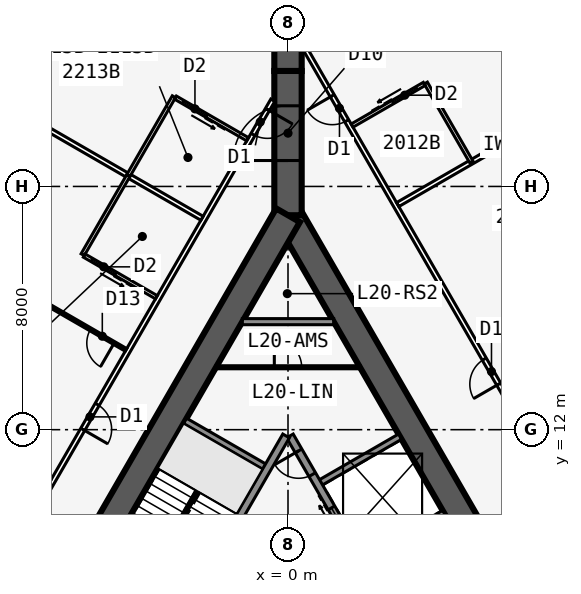
"""IFC4 building model, lengths in metres.
Left out: names, types, materials, properties, quantities, classifications, styles, units other than length and angle.
Written with IfcOpenShell. Run it as: python <this file> out.ifc"""

import sys

from ifc_helpers import new_model, si_unit, direction, frame, frame_2d, origin, place, context, subcontext, project, spatial, rectangle, extrude, element, fill, save


model = new_model("IFC4")
c1 = context("Model", 3, precision=1e-05, world=origin(), true_north=direction((0.0, 1.0)))
c2 = subcontext(c1, "Body", "Model", "MODEL_VIEW")
j1 = project(units=[si_unit("LENGTHUNIT", "METRE"), si_unit("PLANEANGLEUNIT", "RADIAN")], contexts=[c1])
p1 = place(None, origin())
s1 = spatial("IfcSite", under=j1, at=p1, CompositionType="ELEMENT")
p2 = place(p1, origin())
s2 = spatial("IfcBuilding", under=s1, at=p2, CompositionType="ELEMENT")
p3 = place(p2, frame((0.0, 0.0, 79.5)))
s3 = spatial("IfcBuildingStorey", under=s2, at=p3, CompositionType="ELEMENT", Elevation=79.5)
p4 = place(p3, frame((16.5, -9.526, 0.0), z_axis=(0.0, 0.0, 1.0), x_axis=(-0.499999749417, 0.866025548458, 0.0)))
e1 = element("IfcWall", 1, at=p4, inside=s3, PredefinedType="SHEAR", context=c2, shape_type="SweptSolid", body=[
    extrude(rectangle(XDim=33.0, YDim=0.9, at=frame_2d((16.5, 0.0))), origin(), (0.0, 0.0, 1.0), 3.4),
])
p5 = place(p4, frame((14.15, 0.0, 0.0)))
e2 = element("IfcOpeningElement", 2, at=p5, cuts=e1, PredefinedType="OPENING", context=c2, shape_type="SweptSolid", body=[
    extrude(rectangle(XDim=1.8, YDim=2.13, at=frame_2d((0.9, 1.065))), frame((0.0, 0.46, 0.0), z_axis=(0.0, -1.0, 0.0), x_axis=(1.0, 0.0, 0.0)), (0.0, 0.0, 1.0), 0.92),
])
p6 = place(p4, frame((12.6, 0.0, 0.0)))
e3 = element("IfcOpeningElement", 3, at=p6, cuts=e1, PredefinedType="OPENING", context=c2, shape_type="SweptSolid", body=[
    extrude(rectangle(XDim=1.0, YDim=2.13, at=frame_2d((0.5, 1.065))), frame((0.0, 0.46, 0.0), z_axis=(0.0, -1.0, 0.0), x_axis=(1.0, 0.0, 0.0)), (0.0, 0.0, 1.0), 0.92),
])
p7 = place(p3, frame((5.379, 2.586, 0.0), z_axis=(0.0, 0.0, 1.0), x_axis=(-0.500001375892, 0.866024609411, 0.0)))
e4 = element("IfcWall", 4, at=p7, inside=s3, PredefinedType="SOLIDWALL", context=c2, shape_type="SweptSolid", body=[
    extrude(rectangle(XDim=10.633, YDim=0.25, at=frame_2d((5.316, 0.0))), origin(), (0.0, 0.0, 1.0), 3.235),
])
p8 = place(p7, frame((9.164, 0.0, 0.0)))
e5 = element("IfcOpeningElement", 5, at=p8, cuts=e4, PredefinedType="OPENING", context=c2, shape_type="SweptSolid", body=[
    extrude(rectangle(XDim=0.9, YDim=2.13, at=frame_2d((0.45, 1.065))), frame((0.0, 0.135, 0.0), z_axis=(0.0, -1.0, 0.0), x_axis=(1.0, 0.0, 0.0)), (0.0, 0.0, 1.0), 0.27),
])
p9 = place(p7, frame((1.0, 0.0, 0.0)))
e6 = element("IfcOpeningElement", 6, at=p9, cuts=e4, PredefinedType="OPENING", context=c2, shape_type="SweptSolid", body=[
    extrude(rectangle(XDim=1.1, YDim=2.13, at=frame_2d((0.55, 1.065))), frame((0.0, 0.135, 0.0), z_axis=(0.0, -1.0, 0.0), x_axis=(1.0, 0.0, 0.0)), (0.0, 0.0, 1.0), 0.27),
])
p10 = place(p7, frame((3.9, 0.0, 0.0)))
e7 = element("IfcOpeningElement", 7, at=p10, cuts=e4, PredefinedType="OPENING", context=c2, shape_type="SweptSolid", body=[
    extrude(rectangle(XDim=1.1, YDim=2.13, at=frame_2d((0.55, 1.065))), frame((0.0, 0.135, 0.0), z_axis=(0.0, -1.0, 0.0), x_axis=(1.0, 0.0, 0.0)), (0.0, 0.0, 1.0), 0.27),
])
p11 = place(p7, frame((6.8, 0.0, 0.0)))
e8 = element("IfcOpeningElement", 8, at=p11, cuts=e4, PredefinedType="OPENING", context=c2, shape_type="SweptSolid", body=[
    extrude(rectangle(XDim=1.1, YDim=2.13, at=frame_2d((0.55, 1.065))), frame((0.0, 0.135, 0.0), z_axis=(0.0, -1.0, 0.0), x_axis=(1.0, 0.0, 0.0)), (0.0, 0.0, 1.0), 0.27),
])
for number, where, z_axis, x_axis in (
    (9, (2.429, 7.696, 0.0), (0.0, 0.0, 1.0), (0.866, 0.5, 0.0)),
    (10, (0.979, 10.207, 0.0), (0.0, 0.0, 1.0), (0.866, 0.5, 0.0)),
):
    element("IfcWall", number, at=place(p3, frame(where, z_axis=z_axis, x_axis=x_axis)), inside=s3, PredefinedType="SOLIDWALL", context=c2, shape_type="SweptSolid", body=[
        extrude(rectangle(XDim=3.125, YDim=0.2, at=frame_2d((1.562, 0.0))), origin(), (0.0, 0.0, 1.0), 3.235),
    ])
p12 = place(p3, frame((0.0, 19.052, 0.0), z_axis=(0.0, 0.0, 1.0), x_axis=(-0.499999749417, -0.866025548458, 0.0)))
e11 = element("IfcWall", 11, at=p12, inside=s3, PredefinedType="SHEAR", context=c2, shape_type="SweptSolid", body=[
    extrude(rectangle(XDim=33.0, YDim=0.9, at=frame_2d((16.5, 0.0))), origin(), (0.0, 0.0, 1.0), 3.4),
])
p13 = place(p12, frame((14.15, 0.0, 0.0)))
e12 = element("IfcOpeningElement", 12, at=p13, cuts=e11, PredefinedType="OPENING", context=c2, shape_type="SweptSolid", body=[
    extrude(rectangle(XDim=1.8, YDim=2.13, at=frame_2d((0.9, 1.065))), frame((0.0, 0.46, 0.0), z_axis=(0.0, -1.0, 0.0), x_axis=(1.0, 0.0, 0.0)), (0.0, 0.0, 1.0), 0.92),
])
p14 = place(p12, frame((12.6, 0.0, 0.0)))
e13 = element("IfcOpeningElement", 13, at=p14, cuts=e11, PredefinedType="OPENING", context=c2, shape_type="SweptSolid", body=[
    extrude(rectangle(XDim=1.0, YDim=2.13, at=frame_2d((0.5, 1.065))), frame((0.0, 0.46, 0.0), z_axis=(0.0, -1.0, 0.0), x_axis=(1.0, 0.0, 0.0)), (0.0, 0.0, 1.0), 0.92),
])
p15 = place(p3, frame((-0.062, 11.794, 0.0), z_axis=(0.0, 0.0, 1.0), x_axis=(-0.500006680225, -0.86602154692, 0.0)))
e14 = element("IfcWall", 14, at=p15, inside=s3, PredefinedType="SOLIDWALL", context=c2, shape_type="SweptSolid", body=[
    extrude(rectangle(XDim=7.733, YDim=0.25, at=frame_2d((3.866, 0.0))), origin(), (0.0, 0.0, 1.0), 3.235),
])
p16 = place(p3, frame((-0.679, 10.727, 0.0), z_axis=(0.0, 0.0, 1.0), x_axis=(-0.866022959057, 0.500004234368, 0.0)))
e15 = element("IfcWall", 15, at=p16, inside=s3, PredefinedType="SOLIDWALL", context=c2, shape_type="SweptSolid", body=[
    extrude(rectangle(XDim=3.125, YDim=0.2, at=frame_2d((1.562, 0.0))), origin(), (0.0, 0.0, 1.0), 3.235),
])
p17 = place(p3, frame((0.0, 19.052, 0.0), z_axis=(0.0, 0.0, 1.0), x_axis=(0.0, 1.0, 0.0)))
e16 = element("IfcWall", 16, at=p17, inside=s3, PredefinedType="SHEAR", context=c2, shape_type="SweptSolid", body=[
    extrude(rectangle(XDim=4.746, YDim=0.9, at=frame_2d((2.373, 0.0))), origin(), (0.0, 0.0, 1.0), 3.4),
])
p18 = place(p17, frame((1.8, 0.0, 0.0)))
e17 = element("IfcOpeningElement", 17, at=p18, cuts=e16, PredefinedType="OPENING", context=c2, shape_type="SweptSolid", body=[
    extrude(rectangle(XDim=1.8, YDim=2.13, at=frame_2d((0.9, 1.065))), frame((0.0, 0.46, 0.0), z_axis=(0.0, -1.0, 0.0), x_axis=(1.0, 0.0, 0.0)), (0.0, 0.0, 1.0), 0.92),
])
p19 = place(p3, frame((0.0, 23.799, 0.0), z_axis=(0.0, 0.0, 1.0), x_axis=(0.0, 1.0, 0.0)))
e18 = element("IfcWall", 18, at=p19, inside=s3, PredefinedType="SHEAR", context=c2, shape_type="SweptSolid", body=[
    extrude(rectangle(XDim=1.155, YDim=0.9, at=frame_2d((0.577, 0.0))), origin(), (0.0, 0.0, 1.0), 3.4),
])
p20 = place(p3, frame((10.511, 23.357, 0.0), z_axis=(0.0, 0.0, 1.0), x_axis=(-0.682289646561, 0.731081964075, 0.0)))
e19 = element("IfcWall", 19, at=p20, inside=s3, PredefinedType="STANDARD", context=c2, shape_type="SweptSolid", body=[
    extrude(rectangle(XDim=8.211, YDim=0.25, at=frame_2d((4.105, 0.0))), origin(), (0.0, 0.0, 1.0), 3.235),
])
p21 = place(p20, frame((2.006, 0.0, 0.45)))
e20 = element("IfcOpeningElement", 20, at=p21, cuts=e19, PredefinedType="OPENING", context=c2, shape_type="SweptSolid", body=[
    extrude(rectangle(XDim=4.2, YDim=2.4, at=frame_2d((2.1, 1.2))), frame((0.0, 0.135, 0.0), z_axis=(0.0, -1.0, 0.0), x_axis=(1.0, 0.0, 0.0)), (0.0, 0.0, 1.0), 0.27),
])
p22 = place(p3, frame((-4.909, 29.36, 0.0), z_axis=(0.0, 0.0, 1.0), x_axis=(-0.682289646561, -0.731081964075, 0.0)))
e21 = element("IfcWall", 21, at=p22, inside=s3, PredefinedType="STANDARD", context=c2, shape_type="SweptSolid", body=[
    extrude(rectangle(XDim=8.211, YDim=0.25, at=frame_2d((4.105, 0.0))), origin(), (0.0, 0.0, 1.0), 3.235),
])
p23 = place(p22, frame((2.006, 0.0, 0.45)))
e22 = element("IfcOpeningElement", 22, at=p23, cuts=e21, PredefinedType="OPENING", context=c2, shape_type="SweptSolid", body=[
    extrude(rectangle(XDim=4.2, YDim=2.4, at=frame_2d((2.1, 1.2))), frame((0.0, 0.135, 0.0), z_axis=(0.0, -1.0, 0.0), x_axis=(1.0, 0.0, 0.0)), (0.0, 0.0, 1.0), 0.27),
])
p24 = place(p3, frame((21.586, -11.885, 0.0), z_axis=(0.0, 0.0, 1.0), x_axis=(-0.500001915564, 0.86602429783, 0.0)))
e23 = element("IfcWall", 23, at=p24, inside=s3, PredefinedType="PARTITIONING", context=c2, shape_type="SweptSolid", body=[
    extrude(rectangle(XDim=42.172, YDim=0.15, at=frame_2d((21.086, 0.0))), origin(), (0.0, 0.0, 1.0), 3.235),
])
p25 = place(p24, frame((1.911, 0.0, 0.0)))
e24 = element("IfcOpeningElement", 24, at=p25, cuts=e23, PredefinedType="OPENING", context=c2, shape_type="SweptSolid", body=[
    extrude(rectangle(XDim=0.95, YDim=2.13, at=frame_2d((0.475, 1.065))), frame((0.0, 0.085, 0.0), z_axis=(0.0, -1.0, 0.0), x_axis=(1.0, 0.0, 0.0)), (0.0, 0.0, 1.0), 0.17),
])
p26 = place(p24, frame((8.711, 0.0, 0.0)))
e25 = element("IfcOpeningElement", 25, at=p26, cuts=e23, PredefinedType="OPENING", context=c2, shape_type="SweptSolid", body=[
    extrude(rectangle(XDim=0.95, YDim=2.13, at=frame_2d((0.475, 1.065))), frame((0.0, 0.085, 0.0), z_axis=(0.0, -1.0, 0.0), x_axis=(1.0, 0.0, 0.0)), (0.0, 0.0, 1.0), 0.17),
])
p27 = place(p24, frame((13.111, 0.0, 0.0)))
e26 = element("IfcOpeningElement", 26, at=p27, cuts=e23, PredefinedType="OPENING", context=c2, shape_type="SweptSolid", body=[
    extrude(rectangle(XDim=0.95, YDim=2.13, at=frame_2d((0.475, 1.065))), frame((0.0, 0.085, 0.0), z_axis=(0.0, -1.0, 0.0), x_axis=(1.0, 0.0, 0.0)), (0.0, 0.0, 1.0), 0.17),
])
p28 = place(p24, frame((23.711, 0.0, 0.0)))
e27 = element("IfcOpeningElement", 27, at=p28, cuts=e23, PredefinedType="OPENING", context=c2, shape_type="SweptSolid", body=[
    extrude(rectangle(XDim=0.95, YDim=2.13, at=frame_2d((0.475, 1.065))), frame((0.0, 0.085, 0.0), z_axis=(0.0, -1.0, 0.0), x_axis=(1.0, 0.0, 0.0)), (0.0, 0.0, 1.0), 0.17),
])
p29 = place(p24, frame((29.311, 0.0, 0.0)))
e28 = element("IfcOpeningElement", 28, at=p29, cuts=e23, PredefinedType="OPENING", context=c2, shape_type="SweptSolid", body=[
    extrude(rectangle(XDim=0.95, YDim=2.13, at=frame_2d((0.475, 1.065))), frame((0.0, 0.085, 0.0), z_axis=(0.0, -1.0, 0.0), x_axis=(1.0, 0.0, 0.0)), (0.0, 0.0, 1.0), 0.17),
])
p30 = place(p24, frame((39.311, 0.0, 0.0)))
e29 = element("IfcOpeningElement", 29, at=p30, cuts=e23, PredefinedType="OPENING", context=c2, shape_type="SweptSolid", body=[
    extrude(rectangle(XDim=0.95, YDim=2.13, at=frame_2d((0.475, 1.065))), frame((0.0, 0.085, 0.0), z_axis=(0.0, -1.0, 0.0), x_axis=(1.0, 0.0, 0.0)), (0.0, 0.0, 1.0), 0.17),
])
p31 = place(p3, frame((3.608, 19.404, 0.0), z_axis=(0.0, 0.0, 1.0), x_axis=(0.866021300503, 0.500007107024, 0.0)))
e30 = element("IfcWall", 30, at=p31, inside=s3, PredefinedType="PARTITIONING", context=c2, shape_type="SweptSolid", body=[
    extrude(rectangle(XDim=7.82, YDim=0.15, at=frame_2d((3.91, 0.0))), origin(), (0.0, 0.0, 1.0), 2.389),
])
p32 = place(p3, frame((6.033, 20.803, 0.0), z_axis=(0.0, 0.0, 1.0), x_axis=(-0.499990139034, 0.866031096941, 0.0)))
e31 = element("IfcWall", 31, at=p32, inside=s3, PredefinedType="PLUMBINGWALL", context=c2, shape_type="SweptSolid", body=[
    extrude(rectangle(XDim=3.0, YDim=0.12, at=frame_2d((1.5, 0.0))), origin(), (0.0, 0.0, 1.0), 3.235),
])
p33 = place(p3, frame((2.108, 22.002, 0.0), z_axis=(0.0, 0.0, 1.0), x_axis=(0.866035715982, 0.499982138324, 0.0)))
e32 = element("IfcWall", 32, at=p33, inside=s3, PredefinedType="PLUMBINGWALL", context=c2, shape_type="SweptSolid", body=[
    extrude(rectangle(XDim=2.74, YDim=0.12, at=frame_2d((1.37, 0.0))), origin(), (0.0, 0.0, 1.0), 3.235),
])
p34 = place(p33, frame((1.55, 0.0, 0.0)))
e33 = element("IfcOpeningElement", 33, at=p34, cuts=e32, PredefinedType="OPENING", context=c2, shape_type="SweptSolid", body=[
    extrude(rectangle(XDim=0.9, YDim=2.13, at=frame_2d((0.45, 1.065))), frame((0.0, 0.07, 0.0), z_axis=(0.0, -1.0, 0.0), x_axis=(1.0, 0.0, 0.0)), (0.0, 0.0, 1.0), 0.14),
])
p35 = place(p3, frame((-0.5, 22.836, 0.0), z_axis=(0.0, 0.0, 1.0), x_axis=(-0.500001677587, -0.866024435227, 0.0)))
e34 = element("IfcWall", 34, at=p35, inside=s3, PredefinedType="PARTITIONING", context=c2, shape_type="SweptSolid", body=[
    extrude(rectangle(XDim=39.054, YDim=0.15, at=frame_2d((19.527, 0.0))), origin(), (0.0, 0.0, 1.0), 3.235),
])
p36 = place(p35, frame((0.352, 0.0, 0.0)))
e35 = element("IfcOpeningElement", 35, at=p36, cuts=e34, PredefinedType="OPENING", context=c2, shape_type="SweptSolid", body=[
    extrude(rectangle(XDim=0.95, YDim=2.13, at=frame_2d((0.475, 1.065))), frame((0.0, 0.085, 0.0), z_axis=(0.0, -1.0, 0.0), x_axis=(1.0, 0.0, 0.0)), (0.0, 0.0, 1.0), 0.17),
])
p37 = place(p35, frame((11.552, 0.0, 0.0)))
e36 = element("IfcOpeningElement", 36, at=p37, cuts=e34, PredefinedType="OPENING", context=c2, shape_type="SweptSolid", body=[
    extrude(rectangle(XDim=0.95, YDim=2.13, at=frame_2d((0.475, 1.065))), frame((0.0, 0.085, 0.0), z_axis=(0.0, -1.0, 0.0), x_axis=(1.0, 0.0, 0.0)), (0.0, 0.0, 1.0), 0.17),
])
p38 = place(p35, frame((21.552, 0.0, 0.0)))
e37 = element("IfcOpeningElement", 37, at=p38, cuts=e34, PredefinedType="OPENING", context=c2, shape_type="SweptSolid", body=[
    extrude(rectangle(XDim=0.95, YDim=2.13, at=frame_2d((0.475, 1.065))), frame((0.0, 0.085, 0.0), z_axis=(0.0, -1.0, 0.0), x_axis=(1.0, 0.0, 0.0)), (0.0, 0.0, 1.0), 0.17),
])
p39 = place(p35, frame((36.546, 0.0, 0.0)))
e38 = element("IfcOpeningElement", 38, at=p39, cuts=e34, PredefinedType="OPENING", context=c2, shape_type="SweptSolid", body=[
    extrude(rectangle(XDim=0.95, YDim=2.13, at=frame_2d((0.475, 1.065))), frame((0.0, 0.085, 0.0), z_axis=(0.0, -1.0, 0.0), x_axis=(1.0, 0.0, 0.0)), (0.0, 0.0, 1.0), 0.17),
])
p40 = place(p3, frame((-2.829, 18.954, 0.0), z_axis=(0.0, 0.0, 1.0), x_axis=(-0.866020536561, 0.500008430184, 0.0)))
e39 = element("IfcWall", 39, at=p40, inside=s3, PredefinedType="PARTITIONING", context=c2, shape_type="SweptSolid", body=[
    extrude(rectangle(XDim=8.72, YDim=0.15, at=frame_2d((4.36, 0.0))), origin(), (0.0, 0.0, 1.0), 2.389),
])
p41 = place(p3, frame((-5.329, 14.623, 0.0), z_axis=(0.0, 0.0, 1.0), x_axis=(-0.866018409083, 0.500012114982, 0.0)))
e40 = element("IfcWall", 40, at=p41, inside=s3, PredefinedType="PARTITIONING", context=c2, shape_type="SweptSolid", body=[
    extrude(rectangle(XDim=9.485, YDim=0.1, at=frame_2d((4.742, 0.0))), origin(), (0.0, 0.0, 1.0), 2.389),
])
p42 = place(p41, frame((0.45, 0.0, 0.0)))
e41 = element("IfcOpeningElement", 41, at=p42, cuts=e40, PredefinedType="OPENING", context=c2, shape_type="SweptSolid", body=[
    extrude(rectangle(XDim=0.9, YDim=2.13, at=frame_2d((0.45, 1.065))), frame((0.0, 0.06, 0.0), z_axis=(0.0, -1.0, 0.0), x_axis=(1.0, 0.0, 0.0)), (0.0, 0.0, 1.0), 0.12),
])
p43 = place(p3, frame((-3.753, 22.952, 0.0), z_axis=(0.0, 0.0, 1.0), x_axis=(-0.499990139034, -0.866031096941, 0.0)))
e42 = element("IfcWall", 42, at=p43, inside=s3, PredefinedType="PLUMBINGWALL", context=c2, shape_type="SweptSolid", body=[
    extrude(rectangle(XDim=3.0, YDim=0.12, at=frame_2d((1.5, 0.0))), origin(), (0.0, 0.0, 1.0), 3.235),
])
p44 = place(p3, frame((-1.329, 21.552, 0.0), z_axis=(0.0, 0.0, 1.0), x_axis=(-0.865997131366, 0.500048966069, 0.0)))
e43 = element("IfcWall", 43, at=p44, inside=s3, PredefinedType="PLUMBINGWALL", context=c2, shape_type="SweptSolid", body=[
    extrude(rectangle(XDim=2.74, YDim=0.12, at=frame_2d((1.37, 0.0))), origin(), (0.0, 0.0, 1.0), 3.235),
])
p45 = place(p44, frame((1.55, 0.0, 0.0)))
e44 = element("IfcOpeningElement", 44, at=p45, cuts=e43, PredefinedType="OPENING", context=c2, shape_type="SweptSolid", body=[
    extrude(rectangle(XDim=0.9, YDim=2.13, at=frame_2d((0.45, 1.065))), frame((0.0, 0.07, 0.0), z_axis=(0.0, -1.0, 0.0), x_axis=(1.0, 0.0, 0.0)), (0.0, 0.0, 1.0), 0.14),
])
p46 = place(p3, frame((-5.253, 20.354, 0.0), z_axis=(0.0, 0.0, 1.0), x_axis=(-0.499990139034, -0.866031096941, 0.0)))
e45 = element("IfcWall", 45, at=p46, inside=s3, PredefinedType="PLUMBINGWALL", context=c2, shape_type="SweptSolid", body=[
    extrude(rectangle(XDim=3.0, YDim=0.12, at=frame_2d((1.5, 0.0))), origin(), (0.0, 0.0, 1.0), 3.235),
])
p47 = place(p3, frame((-4.329, 16.355, 0.0), z_axis=(0.0, 0.0, 1.0), x_axis=(-0.866035715982, 0.499982138324, 0.0)))
e46 = element("IfcWall", 46, at=p47, inside=s3, PredefinedType="PLUMBINGWALL", context=c2, shape_type="SweptSolid", body=[
    extrude(rectangle(XDim=2.74, YDim=0.12, at=frame_2d((1.37, 0.0))), origin(), (0.0, 0.0, 1.0), 3.235),
])
p48 = place(p47, frame((1.55, 0.0, 0.0)))
e47 = element("IfcOpeningElement", 47, at=p48, cuts=e46, PredefinedType="OPENING", context=c2, shape_type="SweptSolid", body=[
    extrude(rectangle(XDim=0.9, YDim=2.13, at=frame_2d((0.45, 1.065))), frame((0.0, 0.07, 0.0), z_axis=(0.0, -1.0, 0.0), x_axis=(1.0, 0.0, 0.0)), (0.0, 0.0, 1.0), 0.14),
])
p49 = place(p3, frame((-1.501, 15.552, 0.0), z_axis=(0.0, 0.0, 1.0), x_axis=(1.0, 0.0, 0.0)))
e48 = element("IfcWall", 48, at=p49, inside=s3, PredefinedType="SOLIDWALL", context=c2, shape_type="SweptSolid", body=[
    extrude(rectangle(XDim=3.002, YDim=0.2, at=frame_2d((1.501, 0.0))), origin(), (0.0, 0.0, 1.0), 3.235),
])
p50 = place(p3, frame((-2.367, 14.052, 0.0), z_axis=(0.0, 0.0, 1.0), x_axis=(1.0, 0.0, 0.0)))
e49 = element("IfcWall", 49, at=p50, inside=s3, PredefinedType="PARTITIONING", context=c2, shape_type="SweptSolid", body=[
    extrude(rectangle(XDim=4.734, YDim=0.1, at=frame_2d((2.367, 0.0))), origin(), (0.0, 0.0, 1.0), 3.235),
])
p51 = place(p50, frame((1.917, 0.0, 0.0)))
e50 = element("IfcOpeningElement", 50, at=p51, cuts=e49, PredefinedType="OPENING", context=c2, shape_type="SweptSolid", body=[
    extrude(rectangle(XDim=0.9, YDim=2.13, at=frame_2d((0.45, 1.065))), frame((0.0, 0.06, 0.0), z_axis=(0.0, -1.0, 0.0), x_axis=(1.0, 0.0, 0.0)), (0.0, 0.0, 1.0), 0.12),
])
p52 = place(p3, frame((-2.988, 9.978, 0.0), z_axis=(0.0, 0.0, 1.0), x_axis=(-0.499992232847, -0.866029888106, 0.0)))
e51 = element("IfcWall", 51, at=p52, inside=s3, PredefinedType="SOLIDWALL", context=c2, shape_type="SweptSolid", body=[
    extrude(rectangle(XDim=2.794, YDim=0.1, at=frame_2d((1.397, 0.0))), origin(), (0.0, 0.0, 1.0), 3.4),
])
p53 = place(p29, origin())
e52 = element("IfcDoor", 52, at=p53, inside=s3, OperationType="SINGLE_SWING_LEFT", PredefinedType="DOOR", context=c2, shape_type="SweptSolid", body=[
    extrude(rectangle(XDim=0.95, YDim=2.13, at=frame_2d((0.475, 1.065))), frame((0.0, 0.025, 0.0), z_axis=(0.0, -1.0, 0.0), x_axis=(1.0, 0.0, 0.0)), (0.0, 0.0, 1.0), 0.05),
])
fill(e28, e52)
p54 = place(p34, origin())
e53 = element("IfcDoor", 53, at=p54, inside=s3, OperationType="SLIDING_TO_LEFT", PredefinedType="DOOR", context=c2, shape_type="SweptSolid", body=[
    extrude(rectangle(XDim=0.9, YDim=2.13, at=frame_2d((0.45, 1.065))), frame((0.0, 0.025, 0.0), z_axis=(0.0, -1.0, 0.0), x_axis=(1.0, 0.0, 0.0)), (0.0, 0.0, 1.0), 0.05),
])
fill(e33, e53)
p55 = place(p30, origin())
e54 = element("IfcDoor", 54, at=p55, inside=s3, OperationType="SINGLE_SWING_RIGHT", PredefinedType="DOOR", context=c2, shape_type="SweptSolid", body=[
    extrude(rectangle(XDim=0.95, YDim=2.13, at=frame_2d((0.475, 1.065))), frame((0.0, 0.025, 0.0), z_axis=(0.0, -1.0, 0.0), x_axis=(1.0, 0.0, 0.0)), (0.0, 0.0, 1.0), 0.05),
])
fill(e29, e54)
p56 = place(p42, origin())
e55 = element("IfcDoor", 55, at=p56, inside=s3, OperationType="SINGLE_SWING_LEFT", PredefinedType="DOOR", context=c2, shape_type="SweptSolid", body=[
    extrude(rectangle(XDim=0.9, YDim=2.13, at=frame_2d((0.45, 1.065))), frame((0.0, 0.025, 0.0), z_axis=(0.0, -1.0, 0.0), x_axis=(1.0, 0.0, 0.0)), (0.0, 0.0, 1.0), 0.05),
])
fill(e41, e55)
p57 = place(p45, origin())
e56 = element("IfcDoor", 56, at=p57, inside=s3, OperationType="SLIDING_TO_LEFT", PredefinedType="DOOR", context=c2, shape_type="SweptSolid", body=[
    extrude(rectangle(XDim=0.9, YDim=2.13, at=frame_2d((0.45, 1.065))), frame((0.0, 0.025, 0.0), z_axis=(0.0, -1.0, 0.0), x_axis=(1.0, 0.0, 0.0)), (0.0, 0.0, 1.0), 0.05),
])
fill(e44, e56)
p58 = place(p36, origin())
e57 = element("IfcDoor", 57, at=p58, inside=s3, OperationType="SINGLE_SWING_LEFT", PredefinedType="DOOR", context=c2, shape_type="SweptSolid", body=[
    extrude(rectangle(XDim=0.95, YDim=2.13, at=frame_2d((0.475, 1.065))), frame((0.0, 0.025, 0.0), z_axis=(0.0, -1.0, 0.0), x_axis=(1.0, 0.0, 0.0)), (0.0, 0.0, 1.0), 0.05),
])
fill(e35, e57)
p59 = place(p48, origin())
e58 = element("IfcDoor", 58, at=p59, inside=s3, OperationType="SLIDING_TO_LEFT", PredefinedType="DOOR", context=c2, shape_type="SweptSolid", body=[
    extrude(rectangle(XDim=0.9, YDim=2.13, at=frame_2d((0.45, 1.065))), frame((0.0, 0.025, 0.0), z_axis=(0.0, -1.0, 0.0), x_axis=(1.0, 0.0, 0.0)), (0.0, 0.0, 1.0), 0.05),
])
fill(e47, e58)
p60 = place(p37, origin())
e59 = element("IfcDoor", 59, at=p60, inside=s3, OperationType="SINGLE_SWING_RIGHT", PredefinedType="DOOR", context=c2, shape_type="SweptSolid", body=[
    extrude(rectangle(XDim=0.95, YDim=2.13, at=frame_2d((0.475, 1.065))), frame((0.0, 0.025, 0.0), z_axis=(0.0, -1.0, 0.0), x_axis=(1.0, 0.0, 0.0)), (0.0, 0.0, 1.0), 0.05),
])
fill(e36, e59)
p61 = place(p18, origin())
e60 = element("IfcDoor", 60, at=p61, inside=s3, OperationType="DOUBLE_DOOR_DOUBLE_SWING", PredefinedType="DOOR", context=c2, shape_type="SweptSolid", body=[
    extrude(rectangle(XDim=1.8, YDim=2.13, at=frame_2d((0.9, 1.065))), frame((0.0, 0.025, 0.0), z_axis=(0.0, -1.0, 0.0), x_axis=(1.0, 0.0, 0.0)), (0.0, 0.0, 1.0), 0.05),
])
fill(e17, e60)
p62 = place(p51, origin())
e61 = element("IfcDoor", 61, at=p62, inside=s3, OperationType="SINGLE_SWING_LEFT", PredefinedType="DOOR", context=c2, shape_type="SweptSolid", body=[
    extrude(rectangle(XDim=0.9, YDim=2.13, at=frame_2d((0.45, 1.065))), frame((0.0, 0.025, 0.0), z_axis=(0.0, -1.0, 0.0), x_axis=(1.0, 0.0, 0.0)), (0.0, 0.0, 1.0), 0.05),
])
fill(e50, e61)
p63 = place(p8, origin())
e62 = element("IfcDoor", 62, at=p63, inside=s3, OperationType="SINGLE_SWING_RIGHT", PredefinedType="DOOR", context=c2, shape_type="SweptSolid", body=[
    extrude(rectangle(XDim=0.9, YDim=2.13, at=frame_2d((0.45, 1.065))), frame((0.0, 0.025, 0.0), z_axis=(0.0, -1.0, 0.0), x_axis=(1.0, 0.0, 0.0)), (0.0, 0.0, 1.0), 0.05),
])
fill(e5, e62)
p64 = place(p11, origin())
e63 = element("IfcDoor", 63, at=p64, inside=s3, OperationType="DOUBLE_DOOR_SLIDING", PredefinedType="USERDEFINED", context=c2, shape_type="SweptSolid", body=[
    extrude(rectangle(XDim=1.1, YDim=2.13, at=frame_2d((0.55, 1.065))), frame((0.0, 0.025, 0.0), z_axis=(0.0, -1.0, 0.0), x_axis=(1.0, 0.0, 0.0)), (0.0, 0.0, 1.0), 0.05),
])
fill(e8, e63)
save(model, sys.argv[1])
